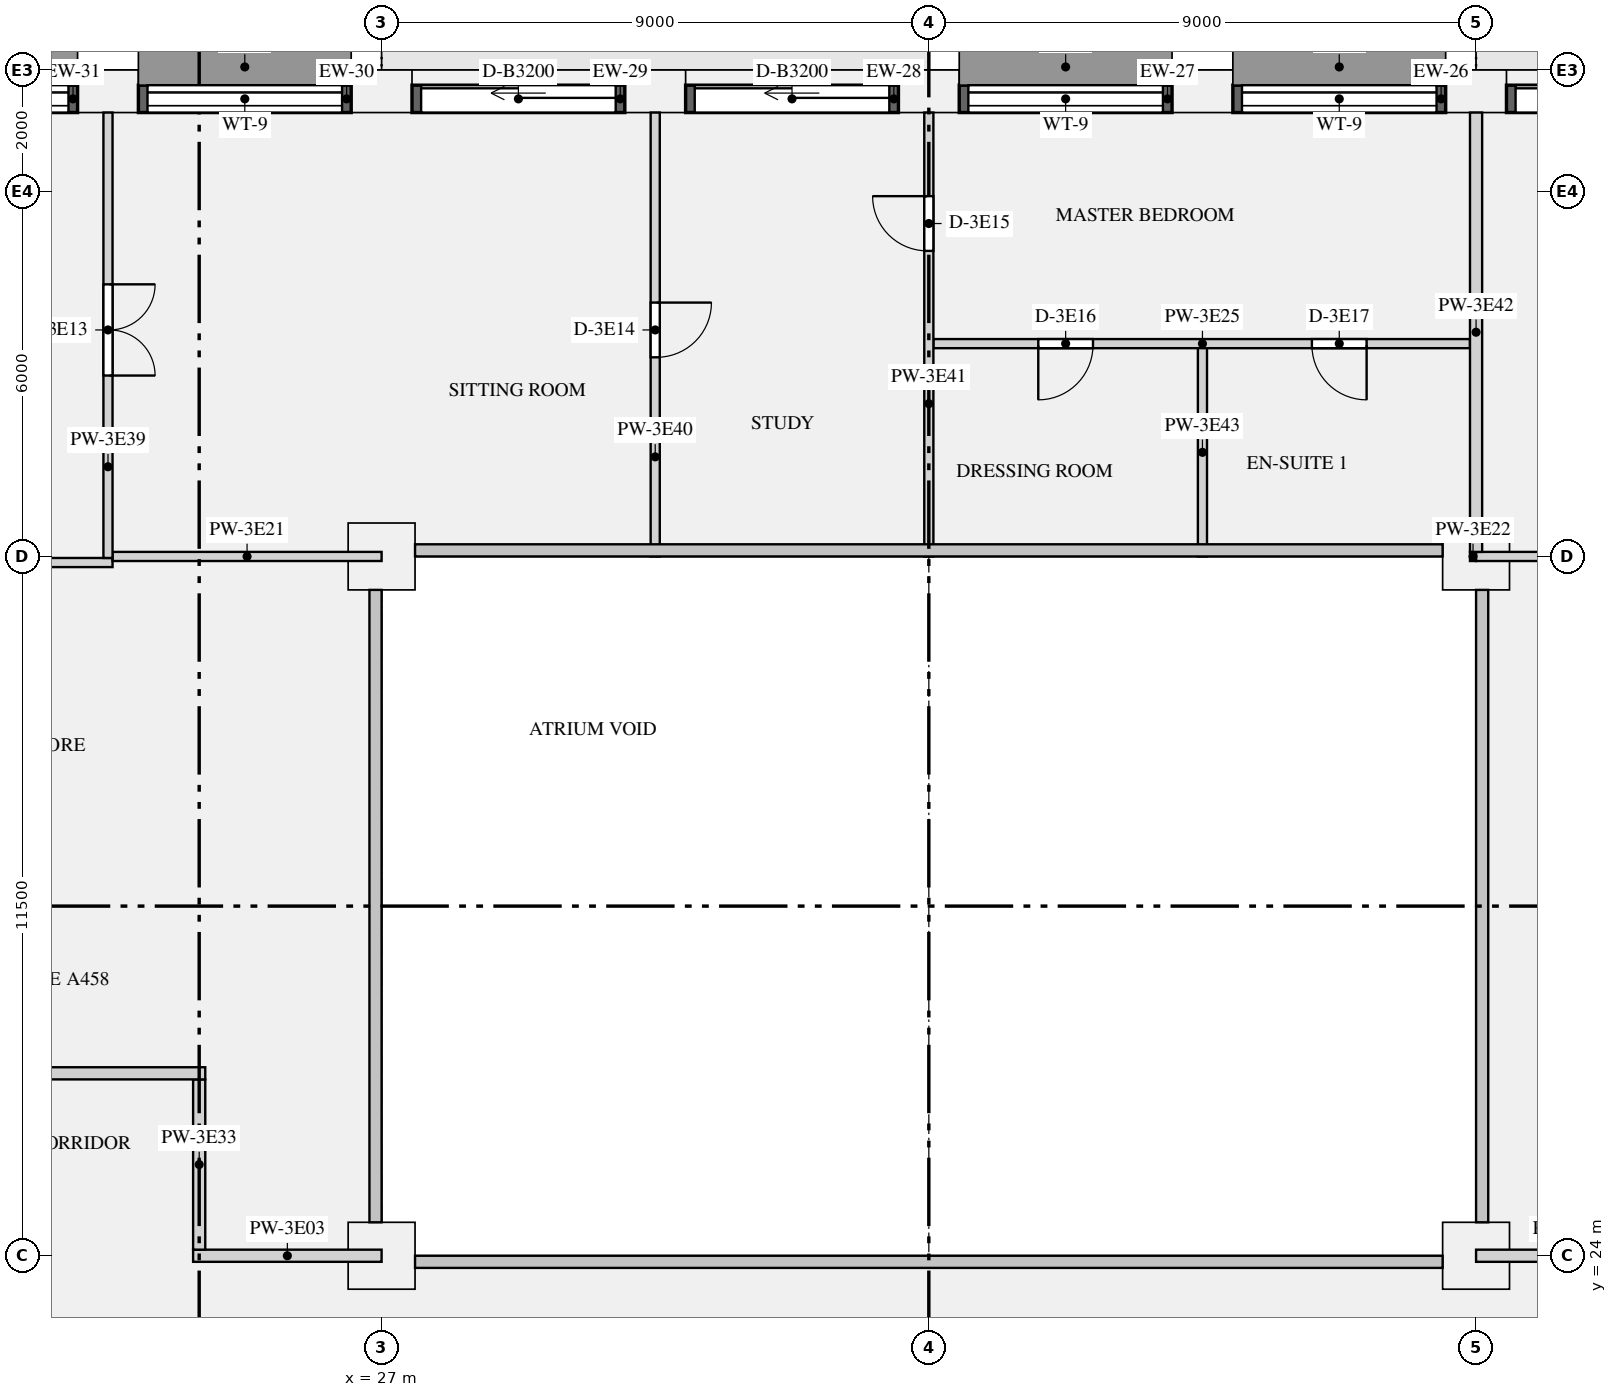
"""IFC4 building model, lengths in metres.
Left out: names, types, materials, properties, quantities, classifications, styles, units other than length and angle.
Written with IfcOpenShell. Run it as: python <this file> out.ifc"""

import sys

from ifc_helpers import new_model, si_unit, direction, frame, frame_2d, origin, origin_2d, place, context, subcontext, project, spatial, rectangle, extrude, element, fill, save


model = new_model("IFC4")
c1 = context("Model", 3, precision=1e-05, world=origin(), true_north=direction((0.0, 1.0)))
c2 = subcontext(c1, "Body", "Model", "MODEL_VIEW")
j1 = project(units=[si_unit("LENGTHUNIT", "METRE"), si_unit("PLANEANGLEUNIT", "RADIAN")], contexts=[c1])
p1 = place(None, origin())
s1 = spatial("IfcSite", under=j1, at=p1, CompositionType="ELEMENT")
p2 = place(p1, origin())
s2 = spatial("IfcBuilding", under=s1, at=p2, CompositionType="ELEMENT")
p3 = place(p2, frame((0.0, 0.0, 172.8)))
s3 = spatial("IfcBuildingStorey", under=s2, at=p3, CompositionType="ELEMENT", Elevation=172.8)
for number, where, z_axis, x_axis in (
    (1, (45.0, 43.15, 0.0), (0.0, 0.0, 1.0), (-1.0, 0.0, 0.0)),
    (2, (40.5, 43.15, 0.0), (0.0, 0.0, 1.0), (-1.0, 0.0, 0.0)),
    (3, (36.0, 43.15, 0.0), (0.0, 0.0, 1.0), (-1.0, 0.0, 0.0)),
    (4, (31.5, 43.15, 0.0), (0.0, 0.0, 1.0), (-1.0, 0.0, 0.0)),
    (5, (27.0, 43.15, 0.0), (0.0, 0.0, 1.0), (-1.0, 0.0, 0.0)),
    (6, (22.5, 43.15, 0.0), (0.0, 0.0, 1.0), (-1.0, 0.0, 0.0)),
):
    element("IfcColumn", number, at=place(p3, frame(where, z_axis=z_axis, x_axis=x_axis)), inside=s3, PredefinedType="USERDEFINED", context=c2, shape_type="SweptSolid", body=[
        extrude(rectangle(XDim=1.0, YDim=0.7, at=origin_2d()), origin(), (0.0, 0.0, 1.0), 3.15),
    ])
for number, where, z_axis, x_axis in (
    (7, (27.0, 24.0, 0.0), (0.0, 0.0, 1.0), (1.0, 0.0, 0.0)),
    (8, (45.0, 24.0, 0.0), (0.0, 0.0, 1.0), (1.0, 0.0, 0.0)),
    (9, (27.0, 35.5, 0.0), (0.0, 0.0, 1.0), (1.0, 0.0, 0.0)),
    (10, (45.0, 35.5, 0.0), (0.0, 0.0, 1.0), (1.0, 0.0, 0.0)),
):
    element("IfcColumn", number, at=place(p3, frame(where, z_axis=z_axis, x_axis=x_axis)), inside=s3, PredefinedType="COLUMN", context=c2, shape_type="SweptSolid", body=[
        extrude(rectangle(XDim=1.1, YDim=1.1, at=origin_2d()), origin(), (0.0, 0.0, 1.0), 3.15),
    ])
p4 = place(p3, frame((49.0, 43.025, 0.0), z_axis=(0.0, 0.0, 1.0), x_axis=(-1.0, 0.0, 0.0)))
e11 = element("IfcWall", 11, at=p4, inside=s3, PredefinedType="SOLIDWALL", context=c2, shape_type="SweptSolid", body=[
    extrude(rectangle(XDim=3.5, YDim=0.45, at=frame_2d((1.75, 0.0))), origin(), (0.0, 0.0, 1.0), 2.83),
])
p5 = place(p4, frame((0.15, 0.0, 0.0)))
e12 = element("IfcOpeningElement", 12, at=p5, cuts=e11, PredefinedType="OPENING", context=c2, shape_type="SweptSolid", body=[
    extrude(rectangle(XDim=3.2, YDim=2.3, at=frame_2d((1.6, 1.15))), frame((0.0, 0.235, 0.0), z_axis=(0.0, -1.0, 0.0), x_axis=(1.0, 0.0, 0.0)), (0.0, 0.0, 1.0), 0.47),
])
p6 = place(p3, frame((44.5, 43.025, 0.9), z_axis=(0.0, 0.0, 1.0), x_axis=(-1.0, 0.0, 0.0)))
e13 = element("IfcWall", 13, at=p6, inside=s3, PredefinedType="SOLIDWALL", context=c2, shape_type="SweptSolid", body=[
    extrude(rectangle(XDim=3.5, YDim=0.45, at=frame_2d((1.75, 0.0))), origin(), (0.0, 0.0, 1.0), 1.93),
])
p7 = place(p6, frame((0.15, 0.0, 0.15)))
e14 = element("IfcOpeningElement", 14, at=p7, cuts=e13, PredefinedType="OPENING", context=c2, shape_type="SweptSolid", body=[
    extrude(rectangle(XDim=3.2, YDim=1.5, at=frame_2d((1.6, 0.75))), frame((0.0, 0.235, 0.0), z_axis=(0.0, -1.0, 0.0), x_axis=(1.0, 0.0, 0.0)), (0.0, 0.0, 1.0), 0.47),
])
p8 = place(p3, frame((40.0, 43.025, 0.9), z_axis=(0.0, 0.0, 1.0), x_axis=(-1.0, 0.0, 0.0)))
e15 = element("IfcWall", 15, at=p8, inside=s3, PredefinedType="SOLIDWALL", context=c2, shape_type="SweptSolid", body=[
    extrude(rectangle(XDim=3.5, YDim=0.45, at=frame_2d((1.75, 0.0))), origin(), (0.0, 0.0, 1.0), 1.93),
])
p9 = place(p8, frame((0.15, 0.0, 0.15)))
e16 = element("IfcOpeningElement", 16, at=p9, cuts=e15, PredefinedType="OPENING", context=c2, shape_type="SweptSolid", body=[
    extrude(rectangle(XDim=3.2, YDim=1.5, at=frame_2d((1.6, 0.75))), frame((0.0, 0.235, 0.0), z_axis=(0.0, -1.0, 0.0), x_axis=(1.0, 0.0, 0.0)), (0.0, 0.0, 1.0), 0.47),
])
p10 = place(p3, frame((35.5, 43.025, 0.0), z_axis=(0.0, 0.0, 1.0), x_axis=(-1.0, 0.0, 0.0)))
e17 = element("IfcWall", 17, at=p10, inside=s3, PredefinedType="SOLIDWALL", context=c2, shape_type="SweptSolid", body=[
    extrude(rectangle(XDim=3.5, YDim=0.45, at=frame_2d((1.75, 0.0))), origin(), (0.0, 0.0, 1.0), 2.83),
])
p11 = place(p10, frame((0.15, 0.0, 0.0)))
e18 = element("IfcOpeningElement", 18, at=p11, cuts=e17, PredefinedType="OPENING", context=c2, shape_type="SweptSolid", body=[
    extrude(rectangle(XDim=3.2, YDim=2.3, at=frame_2d((1.6, 1.15))), frame((0.0, 0.235, 0.0), z_axis=(0.0, -1.0, 0.0), x_axis=(1.0, 0.0, 0.0)), (0.0, 0.0, 1.0), 0.47),
])
p12 = place(p3, frame((31.0, 43.025, 0.0), z_axis=(0.0, 0.0, 1.0), x_axis=(-1.0, 0.0, 0.0)))
e19 = element("IfcWall", 19, at=p12, inside=s3, PredefinedType="SOLIDWALL", context=c2, shape_type="SweptSolid", body=[
    extrude(rectangle(XDim=3.5, YDim=0.45, at=frame_2d((1.75, 0.0))), origin(), (0.0, 0.0, 1.0), 2.83),
])
p13 = place(p12, frame((0.15, 0.0, 0.0)))
e20 = element("IfcOpeningElement", 20, at=p13, cuts=e19, PredefinedType="OPENING", context=c2, shape_type="SweptSolid", body=[
    extrude(rectangle(XDim=3.2, YDim=2.3, at=frame_2d((1.6, 1.15))), frame((0.0, 0.235, 0.0), z_axis=(0.0, -1.0, 0.0), x_axis=(1.0, 0.0, 0.0)), (0.0, 0.0, 1.0), 0.47),
])
p14 = place(p3, frame((26.5, 43.025, 0.9), z_axis=(0.0, 0.0, 1.0), x_axis=(-1.0, 0.0, 0.0)))
e21 = element("IfcWall", 21, at=p14, inside=s3, PredefinedType="SOLIDWALL", context=c2, shape_type="SweptSolid", body=[
    extrude(rectangle(XDim=3.5, YDim=0.45, at=frame_2d((1.75, 0.0))), origin(), (0.0, 0.0, 1.0), 1.93),
])
p15 = place(p14, frame((0.15, 0.0, 0.15)))
e22 = element("IfcOpeningElement", 22, at=p15, cuts=e21, PredefinedType="OPENING", context=c2, shape_type="SweptSolid", body=[
    extrude(rectangle(XDim=3.2, YDim=1.5, at=frame_2d((1.6, 0.75))), frame((0.0, 0.235, 0.0), z_axis=(0.0, -1.0, 0.0), x_axis=(1.0, 0.0, 0.0)), (0.0, 0.0, 1.0), 0.47),
])
p16 = place(p3, frame((22.0, 43.025, 0.9), z_axis=(0.0, 0.0, 1.0), x_axis=(-1.0, 0.0, 0.0)))
e23 = element("IfcWall", 23, at=p16, inside=s3, PredefinedType="SOLIDWALL", context=c2, shape_type="SweptSolid", body=[
    extrude(rectangle(XDim=3.5, YDim=0.45, at=frame_2d((1.75, 0.0))), origin(), (0.0, 0.0, 1.0), 1.93),
])
p17 = place(p16, frame((0.15, 0.0, 0.15)))
e24 = element("IfcOpeningElement", 24, at=p17, cuts=e23, PredefinedType="OPENING", context=c2, shape_type="SweptSolid", body=[
    extrude(rectangle(XDim=3.2, YDim=1.5, at=frame_2d((1.6, 0.75))), frame((0.0, 0.235, 0.0), z_axis=(0.0, -1.0, 0.0), x_axis=(1.0, 0.0, 0.0)), (0.0, 0.0, 1.0), 0.47),
])
for number, where, z_axis, x_axis in (
    (25, (23.9, 24.0, 0.0), (0.0, 0.0, 1.0), (1.0, 0.0, 0.0)),
    (26, (45.0, 24.0, 0.0), (0.0, 0.0, 1.0), (1.0, 0.0, 0.0)),
):
    element("IfcWall", number, at=place(p3, frame(where, z_axis=z_axis, x_axis=x_axis)), inside=s3, PredefinedType="PARTITIONING", context=c2, shape_type="SweptSolid", body=[
        extrude(rectangle(XDim=3.1, YDim=0.2, at=frame_2d((1.55, 0.0))), origin(), (0.0, 0.0, 1.0), 2.83),
    ])
p18 = place(p3, frame((17.1, 27.0, 0.0), z_axis=(0.0, 0.0, 1.0), x_axis=(1.0, 0.0, 0.0)))
e27 = element("IfcWall", 27, at=p18, inside=s3, PredefinedType="PARTITIONING", context=c2, shape_type="SweptSolid", body=[
    extrude(rectangle(XDim=7.0, YDim=0.2, at=frame_2d((3.5, 0.0))), origin(), (0.0, 0.0, 1.0), 2.83),
])
p19 = place(p3, frame((15.8, 35.4, 0.0), z_axis=(0.0, 0.0, 1.0), x_axis=(1.0, 0.0, 0.0)))
e28 = element("IfcWall", 28, at=p19, inside=s3, PredefinedType="PARTITIONING", context=c2, shape_type="SweptSolid", body=[
    extrude(rectangle(XDim=6.775, YDim=0.15, at=frame_2d((3.387, 0.0))), origin(), (0.0, 0.0, 1.0), 2.83),
])
p20 = place(p19, frame((4.275, 0.0, 0.0)))
e29 = element("IfcOpeningElement", 29, at=p20, cuts=e28, PredefinedType="OPENING", context=c2, shape_type="SweptSolid", body=[
    extrude(rectangle(XDim=0.9, YDim=2.1, at=frame_2d((0.45, 1.05))), frame((0.0, 0.085, 0.0), z_axis=(0.0, -1.0, 0.0), x_axis=(1.0, 0.0, 0.0)), (0.0, 0.0, 1.0), 0.17),
])
p21 = place(p3, frame((22.575, 35.5, 0.0), z_axis=(0.0, 0.0, 1.0), x_axis=(1.0, 0.0, 0.0)))
e30 = element("IfcWall", 30, at=p21, inside=s3, PredefinedType="PARTITIONING", context=c2, shape_type="SweptSolid", body=[
    extrude(rectangle(XDim=4.425, YDim=0.15, at=frame_2d((2.212, 0.0))), origin(), (0.0, 0.0, 1.0), 2.83),
])
p22 = place(p3, frame((44.9, 35.5, 0.0), z_axis=(0.0, 0.0, 1.0), x_axis=(1.0, 0.0, 0.0)))
e31 = element("IfcWall", 31, at=p22, inside=s3, PredefinedType="PARTITIONING", context=c2, shape_type="SweptSolid", body=[
    extrude(rectangle(XDim=0.1, YDim=0.15, at=frame_2d((0.05, 0.0))), origin(), (0.0, 0.0, 1.0), 2.83),
])
p23 = place(p3, frame((45.0, 35.5, 0.0), z_axis=(0.0, 0.0, 1.0), x_axis=(1.0, 0.0, 0.0)))
e32 = element("IfcWall", 32, at=p23, inside=s3, PredefinedType="PARTITIONING", context=c2, shape_type="SweptSolid", body=[
    extrude(rectangle(XDim=8.925, YDim=0.15, at=frame_2d((4.462, 0.0))), origin(), (0.0, 0.0, 1.0), 2.83),
])
p24 = place(p23, frame((5.275, 0.0, 0.0)))
e33 = element("IfcOpeningElement", 33, at=p24, cuts=e32, PredefinedType="OPENING", context=c2, shape_type="SweptSolid", body=[
    extrude(rectangle(XDim=0.9, YDim=2.1, at=frame_2d((0.45, 1.05))), frame((0.0, 0.085, 0.0), z_axis=(0.0, -1.0, 0.0), x_axis=(1.0, 0.0, 0.0)), (0.0, 0.0, 1.0), 0.17),
])
p25 = place(p3, frame((36.075, 39.0, 0.0), z_axis=(0.0, 0.0, 1.0), x_axis=(1.0, 0.0, 0.0)))
e34 = element("IfcWall", 34, at=p25, inside=s3, PredefinedType="PARTITIONING", context=c2, shape_type="SweptSolid", body=[
    extrude(rectangle(XDim=8.825, YDim=0.15, at=frame_2d((4.413, 0.0))), origin(), (0.0, 0.0, 1.0), 2.83),
])
p26 = place(p25, frame((1.725, 0.0, 0.0)))
e35 = element("IfcOpeningElement", 35, at=p26, cuts=e34, PredefinedType="OPENING", context=c2, shape_type="SweptSolid", body=[
    extrude(rectangle(XDim=0.9, YDim=2.1, at=frame_2d((0.45, 1.05))), frame((0.0, 0.085, 0.0), z_axis=(0.0, -1.0, 0.0), x_axis=(1.0, 0.0, 0.0)), (0.0, 0.0, 1.0), 0.17),
])
p27 = place(p25, frame((6.225, 0.0, 0.0)))
e36 = element("IfcOpeningElement", 36, at=p27, cuts=e34, PredefinedType="OPENING", context=c2, shape_type="SweptSolid", body=[
    extrude(rectangle(XDim=0.9, YDim=2.1, at=frame_2d((0.45, 1.05))), frame((0.0, 0.085, 0.0), z_axis=(0.0, -1.0, 0.0), x_axis=(1.0, 0.0, 0.0)), (0.0, 0.0, 1.0), 0.17),
])
p28 = place(p3, frame((24.0, 24.1, 0.0), z_axis=(0.0, 0.0, 1.0), x_axis=(0.0, 1.0, 0.0)))
e37 = element("IfcWall", 37, at=p28, inside=s3, PredefinedType="PARTITIONING", context=c2, shape_type="SweptSolid", body=[
    extrude(rectangle(XDim=2.8, YDim=0.2, at=frame_2d((1.4, 0.0))), origin(), (0.0, 0.0, 1.0), 2.83),
])
p29 = place(p3, frame((22.5, 35.475, 0.0), z_axis=(0.0, 0.0, 1.0), x_axis=(0.0, 1.0, 0.0)))
e38 = element("IfcWall", 38, at=p29, inside=s3, PredefinedType="PARTITIONING", context=c2, shape_type="SweptSolid", body=[
    extrude(rectangle(XDim=7.325, YDim=0.15, at=frame_2d((3.663, 0.0))), origin(), (0.0, 0.0, 1.0), 2.83),
])
p30 = place(p29, frame((3.0, 0.0, 0.0)))
e39 = element("IfcOpeningElement", 39, at=p30, cuts=e38, PredefinedType="OPENING", context=c2, shape_type="SweptSolid", body=[
    extrude(rectangle(XDim=1.5, YDim=2.1, at=frame_2d((0.75, 1.05))), frame((0.0, 0.085, 0.0), z_axis=(0.0, -1.0, 0.0), x_axis=(1.0, 0.0, 0.0)), (0.0, 0.0, 1.0), 0.17),
])
p31 = place(p3, frame((31.5, 35.5, 0.0), z_axis=(0.0, 0.0, 1.0), x_axis=(0.0, 1.0, 0.0)))
e40 = element("IfcWall", 40, at=p31, inside=s3, PredefinedType="PARTITIONING", context=c2, shape_type="SweptSolid", body=[
    extrude(rectangle(XDim=7.3, YDim=0.15, at=frame_2d((3.65, 0.0))), origin(), (0.0, 0.0, 1.0), 2.83),
])
p32 = place(p31, frame((3.275, 0.0, 0.0)))
e41 = element("IfcOpeningElement", 41, at=p32, cuts=e40, PredefinedType="OPENING", context=c2, shape_type="SweptSolid", body=[
    extrude(rectangle(XDim=0.9, YDim=2.1, at=frame_2d((0.45, 1.05))), frame((0.0, 0.085, 0.0), z_axis=(0.0, -1.0, 0.0), x_axis=(1.0, 0.0, 0.0)), (0.0, 0.0, 1.0), 0.17),
])
p33 = place(p3, frame((36.0, 35.5, 0.0), z_axis=(0.0, 0.0, 1.0), x_axis=(0.0, 1.0, 0.0)))
e42 = element("IfcWall", 42, at=p33, inside=s3, PredefinedType="PARTITIONING", context=c2, shape_type="SweptSolid", body=[
    extrude(rectangle(XDim=7.3, YDim=0.15, at=frame_2d((3.65, 0.0))), origin(), (0.0, 0.0, 1.0), 2.83),
])
p34 = place(p33, frame((5.025, 0.0, 0.0)))
e43 = element("IfcOpeningElement", 43, at=p34, cuts=e42, PredefinedType="OPENING", context=c2, shape_type="SweptSolid", body=[
    extrude(rectangle(XDim=0.9, YDim=2.1, at=frame_2d((0.45, 1.05))), frame((0.0, 0.085, 0.0), z_axis=(0.0, -1.0, 0.0), x_axis=(1.0, 0.0, 0.0)), (0.0, 0.0, 1.0), 0.17),
])
p35 = place(p3, frame((45.0, 35.575, 0.0), z_axis=(0.0, 0.0, 1.0), x_axis=(0.0, 1.0, 0.0)))
e44 = element("IfcWall", 44, at=p35, inside=s3, PredefinedType="PARTITIONING", context=c2, shape_type="SweptSolid", body=[
    extrude(rectangle(XDim=7.225, YDim=0.2, at=frame_2d((3.613, 0.0))), origin(), (0.0, 0.0, 1.0), 2.83),
])
p36 = place(p3, frame((40.5, 35.5, 0.0), z_axis=(0.0, 0.0, 1.0), x_axis=(0.0, 1.0, 0.0)))
e45 = element("IfcWall", 45, at=p36, inside=s3, PredefinedType="PARTITIONING", context=c2, shape_type="SweptSolid", body=[
    extrude(rectangle(XDim=3.425, YDim=0.15, at=frame_2d((1.712, 0.0))), origin(), (0.0, 0.0, 1.0), 2.83),
])
p37 = place(p5, origin())
e46 = element("IfcDoor", 46, at=p37, inside=s3, OperationType="SLIDING_TO_LEFT", PredefinedType="DOOR", context=c2, shape_type="SweptSolid", body=[
    extrude(rectangle(XDim=3.2, YDim=2.3, at=frame_2d((1.6, 1.15))), frame((0.0, -0.07, 0.0), z_axis=(0.0, -1.0, 0.0), x_axis=(1.0, 0.0, 0.0)), (0.0, 0.0, 1.0), 0.05),
])
fill(e12, e46)
p38 = place(p7, origin())
e47 = element("IfcWindow", 47, at=p38, inside=s3, PartitioningType="SINGLE_PANEL", PredefinedType="WINDOW", context=c2, shape_type="SweptSolid", body=[
    extrude(rectangle(XDim=3.2, YDim=1.5, at=frame_2d((1.6, 0.75))), frame((0.0, -0.065, 0.0), z_axis=(0.0, -1.0, 0.0), x_axis=(1.0, 0.0, 0.0)), (0.0, 0.0, 1.0), 0.06),
])
fill(e14, e47)
p39 = place(p9, origin())
e48 = element("IfcWindow", 48, at=p39, inside=s3, PartitioningType="SINGLE_PANEL", PredefinedType="WINDOW", context=c2, shape_type="SweptSolid", body=[
    extrude(rectangle(XDim=3.2, YDim=1.5, at=frame_2d((1.6, 0.75))), frame((0.0, -0.065, 0.0), z_axis=(0.0, -1.0, 0.0), x_axis=(1.0, 0.0, 0.0)), (0.0, 0.0, 1.0), 0.06),
])
fill(e16, e48)
p40 = place(p11, origin())
e49 = element("IfcDoor", 49, at=p40, inside=s3, OperationType="SLIDING_TO_LEFT", PredefinedType="DOOR", context=c2, shape_type="SweptSolid", body=[
    extrude(rectangle(XDim=3.2, YDim=2.3, at=frame_2d((1.6, 1.15))), frame((0.0, -0.07, 0.0), z_axis=(0.0, -1.0, 0.0), x_axis=(1.0, 0.0, 0.0)), (0.0, 0.0, 1.0), 0.05),
])
fill(e18, e49)
p41 = place(p13, origin())
e50 = element("IfcDoor", 50, at=p41, inside=s3, OperationType="SLIDING_TO_LEFT", PredefinedType="DOOR", context=c2, shape_type="SweptSolid", body=[
    extrude(rectangle(XDim=3.2, YDim=2.3, at=frame_2d((1.6, 1.15))), frame((0.0, -0.07, 0.0), z_axis=(0.0, -1.0, 0.0), x_axis=(1.0, 0.0, 0.0)), (0.0, 0.0, 1.0), 0.05),
])
fill(e20, e50)
p42 = place(p15, origin())
e51 = element("IfcWindow", 51, at=p42, inside=s3, PartitioningType="SINGLE_PANEL", PredefinedType="WINDOW", context=c2, shape_type="SweptSolid", body=[
    extrude(rectangle(XDim=3.2, YDim=1.5, at=frame_2d((1.6, 0.75))), frame((0.0, -0.065, 0.0), z_axis=(0.0, -1.0, 0.0), x_axis=(1.0, 0.0, 0.0)), (0.0, 0.0, 1.0), 0.06),
])
fill(e22, e51)
p43 = place(p17, origin())
e52 = element("IfcWindow", 52, at=p43, inside=s3, PartitioningType="SINGLE_PANEL", PredefinedType="WINDOW", context=c2, shape_type="SweptSolid", body=[
    extrude(rectangle(XDim=3.2, YDim=1.5, at=frame_2d((1.6, 0.75))), frame((0.0, -0.065, 0.0), z_axis=(0.0, -1.0, 0.0), x_axis=(1.0, 0.0, 0.0)), (0.0, 0.0, 1.0), 0.06),
])
fill(e24, e52)
p44 = place(p30, frame((1.5, 0.0, 0.0), z_axis=(0.0, 0.0, 1.0), x_axis=(-1.0, 0.0, 0.0)))
e53 = element("IfcDoor", 53, at=p44, inside=s3, OperationType="DOUBLE_DOOR_SINGLE_SWING", PredefinedType="DOOR", context=c2, shape_type="SweptSolid", body=[
    extrude(rectangle(XDim=1.5, YDim=2.1, at=frame_2d((0.75, 1.05))), frame((0.0, 0.025, 0.0), z_axis=(0.0, -1.0, 0.0), x_axis=(1.0, 0.0, 0.0)), (0.0, 0.0, 1.0), 0.05),
])
fill(e39, e53)
p45 = place(p32, frame((0.9, 0.0, 0.0), z_axis=(0.0, 0.0, 1.0), x_axis=(-1.0, 0.0, 0.0)))
e54 = element("IfcDoor", 54, at=p45, inside=s3, OperationType="SINGLE_SWING_LEFT", PredefinedType="DOOR", context=c2, shape_type="SweptSolid", body=[
    extrude(rectangle(XDim=0.9, YDim=2.1, at=frame_2d((0.45, 1.05))), frame((0.0, 0.025, 0.0), z_axis=(0.0, -1.0, 0.0), x_axis=(1.0, 0.0, 0.0)), (0.0, 0.0, 1.0), 0.05),
])
fill(e41, e54)
p46 = place(p34, origin())
e55 = element("IfcDoor", 55, at=p46, inside=s3, OperationType="SINGLE_SWING_RIGHT", PredefinedType="DOOR", context=c2, shape_type="SweptSolid", body=[
    extrude(rectangle(XDim=0.9, YDim=2.1, at=frame_2d((0.45, 1.05))), frame((0.0, 0.025, 0.0), z_axis=(0.0, -1.0, 0.0), x_axis=(1.0, 0.0, 0.0)), (0.0, 0.0, 1.0), 0.05),
])
fill(e43, e55)
p47 = place(p26, frame((0.9, 0.0, 0.0), z_axis=(0.0, 0.0, 1.0), x_axis=(-1.0, 0.0, 0.0)))
e56 = element("IfcDoor", 56, at=p47, inside=s3, OperationType="SINGLE_SWING_RIGHT", PredefinedType="DOOR", context=c2, shape_type="SweptSolid", body=[
    extrude(rectangle(XDim=0.9, YDim=2.1, at=frame_2d((0.45, 1.05))), frame((0.0, 0.025, 0.0), z_axis=(0.0, -1.0, 0.0), x_axis=(1.0, 0.0, 0.0)), (0.0, 0.0, 1.0), 0.05),
])
fill(e35, e56)
p48 = place(p27, frame((0.9, 0.0, 0.0), z_axis=(0.0, 0.0, 1.0), x_axis=(-1.0, 0.0, 0.0)))
e57 = element("IfcDoor", 57, at=p48, inside=s3, OperationType="SINGLE_SWING_LEFT", PredefinedType="DOOR", context=c2, shape_type="SweptSolid", body=[
    extrude(rectangle(XDim=0.9, YDim=2.1, at=frame_2d((0.45, 1.05))), frame((0.0, 0.025, 0.0), z_axis=(0.0, -1.0, 0.0), x_axis=(1.0, 0.0, 0.0)), (0.0, 0.0, 1.0), 0.05),
])
fill(e36, e57)
save(model, sys.argv[1])
